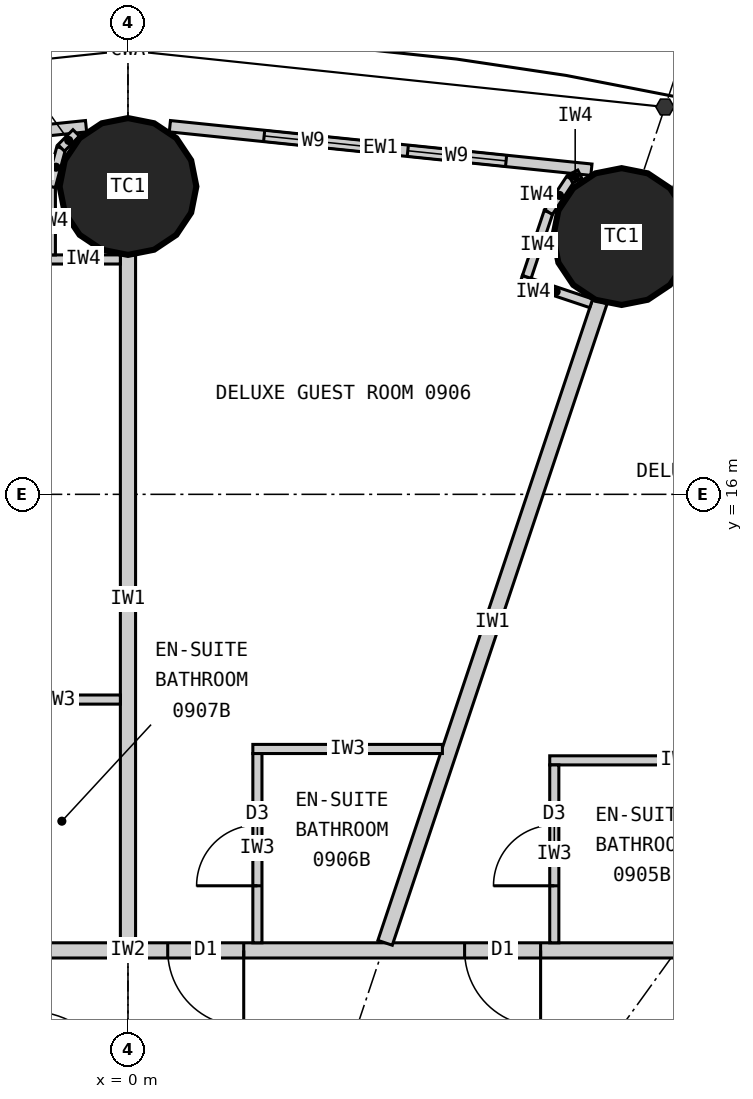
"""IFC4 building model, lengths in metres.
Left out: names, types, materials, properties, quantities, classifications, styles, units other than length and angle.
Written with IfcOpenShell. Run it as: python <this file> out.ifc"""

import sys

from ifc_helpers import new_model, si_unit, direction, frame, frame_2d, origin, origin_2d, place, context, subcontext, project, spatial, rectangle, circle, extrude, element, fill, save


model = new_model("IFC4")
c1 = context("Model", 3, precision=1e-05, world=origin(), true_north=direction((0.0, 1.0)))
c2 = subcontext(c1, "Body", "Model", "MODEL_VIEW")
j1 = project(units=[si_unit("LENGTHUNIT", "METRE"), si_unit("PLANEANGLEUNIT", "RADIAN")], contexts=[c1])
p1 = place(None, origin())
s1 = spatial("IfcSite", under=j1, at=p1, CompositionType="ELEMENT")
p2 = place(p1, origin())
s2 = spatial("IfcBuilding", under=s1, at=p2, CompositionType="ELEMENT")
p3 = place(p2, frame((0.0, 0.0, 42.6)))
s3 = spatial("IfcBuildingStorey", under=s2, at=p3, CompositionType="ELEMENT", Elevation=42.6)
for number, where, z_axis, x_axis in (
    (1, (6.495, 19.391, 0.0), (0.0, 0.0, 1.0), (1.0, 0.0, 0.0)),
    (2, (0.0, 20.05, 0.0), (0.0, 0.0, 1.0), (1.0, 0.0, 0.0)),
):
    element("IfcColumn", number, at=place(p3, frame(where, z_axis=z_axis, x_axis=x_axis)), inside=s3, PredefinedType="COLUMN", context=c2, shape_type="SweptSolid", body=[
        extrude(circle(Radius=0.9, at=origin_2d()), origin(), (0.0, 0.0, 1.0), 3.3),
    ])
p4 = place(p3, frame((12.366, 18.384, 0.0), z_axis=(0.0, 0.0, 1.0), x_axis=(-0.951138486029, 0.308764603532, 0.0)))
e3 = element("IfcWall", 3, at=p4, inside=s3, PredefinedType="ELEMENTEDWALL", context=c2, shape_type="SweptSolid", body=[
    extrude(rectangle(XDim=5.444, YDim=0.15, at=frame_2d((2.722, 0.0))), origin(), (0.0, 0.0, 1.0), 3.05),
])
p5 = place(p4, frame((0.96, 0.0, 0.9)))
e4 = element("IfcOpeningElement", 4, at=p5, cuts=e3, PredefinedType="OPENING", context=c2, shape_type="SweptSolid", body=[
    extrude(rectangle(XDim=1.3, YDim=1.9, at=frame_2d((0.65, 0.95))), frame((0.0, 0.085, 0.0), z_axis=(0.0, -1.0, 0.0), x_axis=(1.0, 0.0, 0.0)), (0.0, 0.0, 1.0), 0.17),
])
p6 = place(p4, frame((2.86, 0.0, 0.9)))
e5 = element("IfcOpeningElement", 5, at=p6, cuts=e3, PredefinedType="OPENING", context=c2, shape_type="SweptSolid", body=[
    extrude(rectangle(XDim=1.3, YDim=1.9, at=frame_2d((0.65, 0.95))), frame((0.0, 0.085, 0.0), z_axis=(0.0, -1.0, 0.0), x_axis=(1.0, 0.0, 0.0)), (0.0, 0.0, 1.0), 0.17),
])
p7 = place(p3, frame((6.098, 20.271, 0.0), z_axis=(0.0, 0.0, 1.0), x_axis=(-0.994723735084, 0.102589915983, 0.0)))
e6 = element("IfcWall", 6, at=p7, inside=s3, PredefinedType="ELEMENTEDWALL", context=c2, shape_type="SweptSolid", body=[
    extrude(rectangle(XDim=5.576, YDim=0.15, at=frame_2d((2.788, 0.0))), origin(), (0.0, 0.0, 1.0), 3.05),
])
p8 = place(p7, frame((1.129, 0.0, 0.9)))
e7 = element("IfcOpeningElement", 7, at=p8, cuts=e6, PredefinedType="OPENING", context=c2, shape_type="SweptSolid", body=[
    extrude(rectangle(XDim=1.3, YDim=1.9, at=frame_2d((0.65, 0.95))), frame((0.0, 0.085, 0.0), z_axis=(0.0, -1.0, 0.0), x_axis=(1.0, 0.0, 0.0)), (0.0, 0.0, 1.0), 0.17),
])
p9 = place(p7, frame((3.029, 0.0, 0.9)))
e8 = element("IfcOpeningElement", 8, at=p9, cuts=e6, PredefinedType="OPENING", context=c2, shape_type="SweptSolid", body=[
    extrude(rectangle(XDim=1.3, YDim=1.9, at=frame_2d((0.65, 0.95))), frame((0.0, 0.085, 0.0), z_axis=(0.0, -1.0, 0.0), x_axis=(1.0, 0.0, 0.0)), (0.0, 0.0, 1.0), 0.17),
])
p10 = place(p3, frame((-0.551, 20.843, 0.0), z_axis=(0.0, 0.0, 1.0), x_axis=(-0.994723735084, -0.102589915983, 0.0)))
e9 = element("IfcWall", 9, at=p10, inside=s3, PredefinedType="ELEMENTEDWALL", context=c2, shape_type="SweptSolid", body=[
    extrude(rectangle(XDim=5.576, YDim=0.15, at=frame_2d((2.788, 0.0))), origin(), (0.0, 0.0, 1.0), 3.05),
])
p11 = place(p10, frame((1.247, 0.0, 0.9)))
e10 = element("IfcOpeningElement", 10, at=p11, cuts=e9, PredefinedType="OPENING", context=c2, shape_type="SweptSolid", body=[
    extrude(rectangle(XDim=1.3, YDim=1.9, at=frame_2d((0.65, 0.95))), frame((0.0, 0.085, 0.0), z_axis=(0.0, -1.0, 0.0), x_axis=(1.0, 0.0, 0.0)), (0.0, 0.0, 1.0), 0.17),
])
p12 = place(p10, frame((3.147, 0.0, 0.9)))
e11 = element("IfcOpeningElement", 11, at=p12, cuts=e9, PredefinedType="OPENING", context=c2, shape_type="SweptSolid", body=[
    extrude(rectangle(XDim=1.3, YDim=1.9, at=frame_2d((0.65, 0.95))), frame((0.0, 0.085, 0.0), z_axis=(0.0, -1.0, 0.0), x_axis=(1.0, 0.0, 0.0)), (0.0, 0.0, 1.0), 0.17),
])
p13 = place(p3, frame((-14.1, 10.0, 0.0), z_axis=(0.0, 0.0, 1.0), x_axis=(1.0, 0.0, 0.0)))
e12 = element("IfcWall", 12, at=p13, inside=s3, PredefinedType="PARTITIONING", context=c2, shape_type="SweptSolid", body=[
    extrude(rectangle(XDim=28.2, YDim=0.2, at=frame_2d((14.1, 0.0))), origin(), (0.0, 0.0, 1.0), 3.05),
])
p14 = place(p13, frame((23.477, 0.0, 0.0)))
e13 = element("IfcOpeningElement", 13, at=p14, cuts=e12, PredefinedType="OPENING", context=c2, shape_type="SweptSolid", body=[
    extrude(rectangle(XDim=1.0, YDim=2.2, at=frame_2d((0.5, 1.1))), frame((0.0, 0.11, 0.0), z_axis=(0.0, -1.0, 0.0), x_axis=(1.0, 0.0, 0.0)), (0.0, 0.0, 1.0), 0.22),
])
p15 = place(p13, frame((18.529, 0.0, 0.0)))
e14 = element("IfcOpeningElement", 14, at=p15, cuts=e12, PredefinedType="OPENING", context=c2, shape_type="SweptSolid", body=[
    extrude(rectangle(XDim=1.0, YDim=2.2, at=frame_2d((0.5, 1.1))), frame((0.0, 0.11, 0.0), z_axis=(0.0, -1.0, 0.0), x_axis=(1.0, 0.0, 0.0)), (0.0, 0.0, 1.0), 0.22),
])
p16 = place(p13, frame((14.623, 0.0, 0.0)))
e15 = element("IfcOpeningElement", 15, at=p16, cuts=e12, PredefinedType="OPENING", context=c2, shape_type="SweptSolid", body=[
    extrude(rectangle(XDim=1.0, YDim=2.2, at=frame_2d((0.5, 1.1))), frame((0.0, 0.11, 0.0), z_axis=(0.0, -1.0, 0.0), x_axis=(1.0, 0.0, 0.0)), (0.0, 0.0, 1.0), 0.22),
])
p17 = place(p13, frame((11.252, 0.0, 0.0)))
e16 = element("IfcOpeningElement", 16, at=p17, cuts=e12, PredefinedType="OPENING", context=c2, shape_type="SweptSolid", body=[
    extrude(rectangle(XDim=1.0, YDim=2.1, at=frame_2d((0.5, 1.05))), frame((0.0, 0.11, 0.0), z_axis=(0.0, -1.0, 0.0), x_axis=(1.0, 0.0, 0.0)), (0.0, 0.0, 1.0), 0.22),
])
p18 = place(p13, frame((8.671, 0.0, 0.0)))
e17 = element("IfcOpeningElement", 17, at=p18, cuts=e12, PredefinedType="OPENING", context=c2, shape_type="SweptSolid", body=[
    extrude(rectangle(XDim=1.0, YDim=2.2, at=frame_2d((0.5, 1.1))), frame((0.0, 0.11, 0.0), z_axis=(0.0, -1.0, 0.0), x_axis=(1.0, 0.0, 0.0)), (0.0, 0.0, 1.0), 0.22),
])
p19 = place(p13, frame((1.616, 0.0, 0.0)))
e18 = element("IfcOpeningElement", 18, at=p19, cuts=e12, PredefinedType="OPENING", context=c2, shape_type="SweptSolid", body=[
    extrude(rectangle(XDim=1.0, YDim=2.2, at=frame_2d((0.5, 1.1))), frame((0.0, 0.11, 0.0), z_axis=(0.0, -1.0, 0.0), x_axis=(1.0, 0.0, 0.0)), (0.0, 0.0, 1.0), 0.22),
])
p20 = place(p3, frame((3.383, 10.1, 0.0), z_axis=(0.0, 0.0, 1.0), x_axis=(0.317593727596, 0.948226884344, 0.0)))
e19 = element("IfcWall", 19, at=p20, inside=s3, PredefinedType="PARTITIONING", context=c2, shape_type="SweptSolid", body=[
    extrude(rectangle(XDim=8.899, YDim=0.2, at=frame_2d((4.449, 0.0))), origin(), (0.0, 0.0, 1.0), 2.15),
])
p21 = place(p3, frame((0.0, 10.1, 0.0), z_axis=(0.0, 0.0, 1.0), x_axis=(0.0, 1.0, 0.0)))
e20 = element("IfcWall", 20, at=p21, inside=s3, PredefinedType="PARTITIONING", context=c2, shape_type="SweptSolid", body=[
    extrude(rectangle(XDim=9.05, YDim=0.2, at=frame_2d((4.525, 0.0))), origin(), (0.0, 0.0, 1.0), 2.15),
])
p22 = place(p3, frame((8.921, 12.5, 0.0), z_axis=(0.0, 0.0, 1.0), x_axis=(-1.0, 0.0, 0.0)))
e21 = element("IfcWall", 21, at=p22, inside=s3, PredefinedType="PARTITIONING", context=c2, shape_type="SweptSolid", body=[
    extrude(rectangle(XDim=3.372, YDim=0.12, at=frame_2d((1.686, 0.0))), origin(), (0.0, 0.0, 1.0), 3.05),
])
p23 = place(p3, frame((5.609, 10.1, 0.0), z_axis=(0.0, 0.0, 1.0), x_axis=(0.0, 1.0, 0.0)))
e22 = element("IfcWall", 22, at=p23, inside=s3, PredefinedType="PARTITIONING", context=c2, shape_type="SweptSolid", body=[
    extrude(rectangle(XDim=2.34, YDim=0.12, at=frame_2d((1.17, 0.0))), origin(), (0.0, 0.0, 1.0), 3.05),
])
p24 = place(p23, frame((0.75, 0.0, 0.0)))
e23 = element("IfcOpeningElement", 23, at=p24, cuts=e22, PredefinedType="OPENING", context=c2, shape_type="SweptSolid", body=[
    extrude(rectangle(XDim=0.8, YDim=2.1, at=frame_2d((0.4, 1.05))), frame((0.0, 0.07, 0.0), z_axis=(0.0, -1.0, 0.0), x_axis=(1.0, 0.0, 0.0)), (0.0, 0.0, 1.0), 0.14),
])
p25 = place(p3, frame((4.137, 12.65, 0.0), z_axis=(0.0, 0.0, 1.0), x_axis=(-1.0, 0.0, 0.0)))
e24 = element("IfcWall", 24, at=p25, inside=s3, PredefinedType="PARTITIONING", context=c2, shape_type="SweptSolid", body=[
    extrude(rectangle(XDim=2.494, YDim=0.12, at=frame_2d((1.247, 0.0))), origin(), (0.0, 0.0, 1.0), 3.05),
])
p26 = place(p3, frame((1.703, 10.1, 0.0), z_axis=(0.0, 0.0, 1.0), x_axis=(0.0, 1.0, 0.0)))
e25 = element("IfcWall", 25, at=p26, inside=s3, PredefinedType="PARTITIONING", context=c2, shape_type="SweptSolid", body=[
    extrude(rectangle(XDim=2.49, YDim=0.12, at=frame_2d((1.245, 0.0))), origin(), (0.0, 0.0, 1.0), 3.05),
])
p27 = place(p26, frame((0.75, 0.0, 0.0)))
e26 = element("IfcOpeningElement", 26, at=p27, cuts=e25, PredefinedType="OPENING", context=c2, shape_type="SweptSolid", body=[
    extrude(rectangle(XDim=0.8, YDim=2.1, at=frame_2d((0.4, 1.05))), frame((0.0, 0.07, 0.0), z_axis=(0.0, -1.0, 0.0), x_axis=(1.0, 0.0, 0.0)), (0.0, 0.0, 1.0), 0.14),
])
p28 = place(p3, frame((-0.1, 13.3, 0.0), z_axis=(0.0, 0.0, 1.0), x_axis=(-1.0, 0.0, 0.0)))
e27 = element("IfcWall", 27, at=p28, inside=s3, PredefinedType="PARTITIONING", context=c2, shape_type="SweptSolid", body=[
    extrude(rectangle(XDim=1.64, YDim=0.12, at=frame_2d((0.82, 0.0))), origin(), (0.0, 0.0, 1.0), 3.05),
])
p29 = place(p3, frame((6.095, 18.513, 0.0), z_axis=(0.0, 0.0, 1.0), x_axis=(-0.948281677008, 0.317430088446, 0.0)))
e28 = element("IfcWall", 28, at=p29, inside=s3, PredefinedType="PARTITIONING", context=c2, shape_type="SweptSolid", body=[
    extrude(rectangle(XDim=0.974, YDim=0.12, at=frame_2d((0.487, 0.0))), origin(), (0.0, 0.0, 1.0), 3.05),
])
p30 = place(p3, frame((5.247, 18.86, 0.0), z_axis=(0.0, 0.0, 1.0), x_axis=(0.317610704489, 0.94822119803, 0.0)))
e29 = element("IfcWall", 29, at=p30, inside=s3, PredefinedType="PARTITIONING", context=c2, shape_type="SweptSolid", body=[
    extrude(rectangle(XDim=0.9, YDim=0.12, at=frame_2d((0.45, 0.0))), origin(), (0.0, 0.0, 1.0), 3.05),
])
p31 = place(p3, frame((5.533, 19.714, 0.0), z_axis=(0.0, 0.0, 1.0), x_axis=(0.552014331743, 0.833834622422, 0.0)))
e30 = element("IfcWall", 30, at=p31, inside=s3, PredefinedType="PARTITIONING", context=c2, shape_type="SweptSolid", body=[
    extrude(rectangle(XDim=0.525, YDim=0.12, at=frame_2d((0.262, 0.0))), origin(), (0.0, 0.0, 1.0), 3.05),
])
p32 = place(p3, frame((5.823, 20.151, 0.0), z_axis=(0.0, 0.0, 1.0), x_axis=(0.894784104941, 0.446499054362, 0.0)))
e31 = element("IfcWall", 31, at=p32, inside=s3, PredefinedType="PARTITIONING", context=c2, shape_type="SweptSolid", body=[
    extrude(rectangle(XDim=0.137, YDim=0.12, at=frame_2d((0.068, 0.0))), origin(), (0.0, 0.0, 1.0), 3.05),
])
p33 = place(p3, frame((-0.1, 19.09, 0.0), z_axis=(0.0, 0.0, 1.0), x_axis=(-1.0, 0.0, 0.0)))
e32 = element("IfcWall", 32, at=p33, inside=s3, PredefinedType="PARTITIONING", context=c2, shape_type="SweptSolid", body=[
    extrude(rectangle(XDim=0.974, YDim=0.12, at=frame_2d((0.487, 0.0))), origin(), (0.0, 0.0, 1.0), 3.05),
])
p34 = place(p3, frame((-1.015, 19.15, 0.0), z_axis=(0.0, 0.0, 1.0), x_axis=(0.0, 1.0, 0.0)))
e33 = element("IfcWall", 33, at=p34, inside=s3, PredefinedType="PARTITIONING", context=c2, shape_type="SweptSolid", body=[
    extrude(rectangle(XDim=0.9, YDim=0.12, at=frame_2d((0.45, 0.0))), origin(), (0.0, 0.0, 1.0), 3.05),
])
p35 = place(p3, frame((-1.015, 20.05, 0.0), z_axis=(0.0, 0.0, 1.0), x_axis=(0.258906465625, 0.96590239779, 0.0)))
e34 = element("IfcWall", 34, at=p35, inside=s3, PredefinedType="PARTITIONING", context=c2, shape_type="SweptSolid", body=[
    extrude(rectangle(XDim=0.525, YDim=0.12, at=frame_2d((0.263, 0.0))), origin(), (0.0, 0.0, 1.0), 3.05),
])
p36 = place(p3, frame((-0.879, 20.557, 0.0), z_axis=(0.0, 0.0, 1.0), x_axis=(0.707106781187, 0.707106781187, 0.0)))
e35 = element("IfcWall", 35, at=p36, inside=s3, PredefinedType="PARTITIONING", context=c2, shape_type="SweptSolid", body=[
    extrude(rectangle(XDim=0.279, YDim=0.12, at=frame_2d((0.14, 0.0))), origin(), (0.0, 0.0, 1.0), 3.05),
])
p37 = place(p8, origin())
e36 = element("IfcWindow", 36, at=p37, inside=s3, PartitioningType="SINGLE_PANEL", PredefinedType="WINDOW", context=c2, shape_type="SweptSolid", body=[
    extrude(rectangle(XDim=1.3, YDim=1.9, at=frame_2d((0.65, 0.95))), frame((0.0, 0.03, 0.0), z_axis=(0.0, -1.0, 0.0), x_axis=(1.0, 0.0, 0.0)), (0.0, 0.0, 1.0), 0.06),
])
fill(e7, e36)
p38 = place(p9, origin())
e37 = element("IfcWindow", 37, at=p38, inside=s3, PartitioningType="SINGLE_PANEL", PredefinedType="WINDOW", context=c2, shape_type="SweptSolid", body=[
    extrude(rectangle(XDim=1.3, YDim=1.9, at=frame_2d((0.65, 0.95))), frame((0.0, 0.03, 0.0), z_axis=(0.0, -1.0, 0.0), x_axis=(1.0, 0.0, 0.0)), (0.0, 0.0, 1.0), 0.06),
])
fill(e8, e37)
p39 = place(p24, origin())
e38 = element("IfcDoor", 38, at=p39, inside=s3, OperationType="SINGLE_SWING_LEFT", PredefinedType="DOOR", context=c2, shape_type="SweptSolid", body=[
    extrude(rectangle(XDim=0.8, YDim=2.1, at=frame_2d((0.4, 1.05))), frame((0.0, 0.025, 0.0), z_axis=(0.0, -1.0, 0.0), x_axis=(1.0, 0.0, 0.0)), (0.0, 0.0, 1.0), 0.05),
])
fill(e23, e38)
p40 = place(p15, origin())
e39 = element("IfcDoor", 39, at=p40, inside=s3, OperationType="SINGLE_SWING_RIGHT", PredefinedType="DOOR", context=c2, shape_type="SweptSolid", body=[
    extrude(rectangle(XDim=1.0, YDim=2.2, at=frame_2d((0.5, 1.1))), frame((0.0, 0.025, 0.0), z_axis=(0.0, -1.0, 0.0), x_axis=(1.0, 0.0, 0.0)), (0.0, 0.0, 1.0), 0.05),
])
fill(e14, e39)
p41 = place(p27, origin())
e40 = element("IfcDoor", 40, at=p41, inside=s3, OperationType="SINGLE_SWING_LEFT", PredefinedType="DOOR", context=c2, shape_type="SweptSolid", body=[
    extrude(rectangle(XDim=0.8, YDim=2.1, at=frame_2d((0.4, 1.05))), frame((0.0, 0.025, 0.0), z_axis=(0.0, -1.0, 0.0), x_axis=(1.0, 0.0, 0.0)), (0.0, 0.0, 1.0), 0.05),
])
fill(e26, e40)
p42 = place(p16, origin())
e41 = element("IfcDoor", 41, at=p42, inside=s3, OperationType="SINGLE_SWING_RIGHT", PredefinedType="DOOR", context=c2, shape_type="SweptSolid", body=[
    extrude(rectangle(XDim=1.0, YDim=2.2, at=frame_2d((0.5, 1.1))), frame((0.0, 0.025, 0.0), z_axis=(0.0, -1.0, 0.0), x_axis=(1.0, 0.0, 0.0)), (0.0, 0.0, 1.0), 0.05),
])
fill(e15, e41)
save(model, sys.argv[1])
